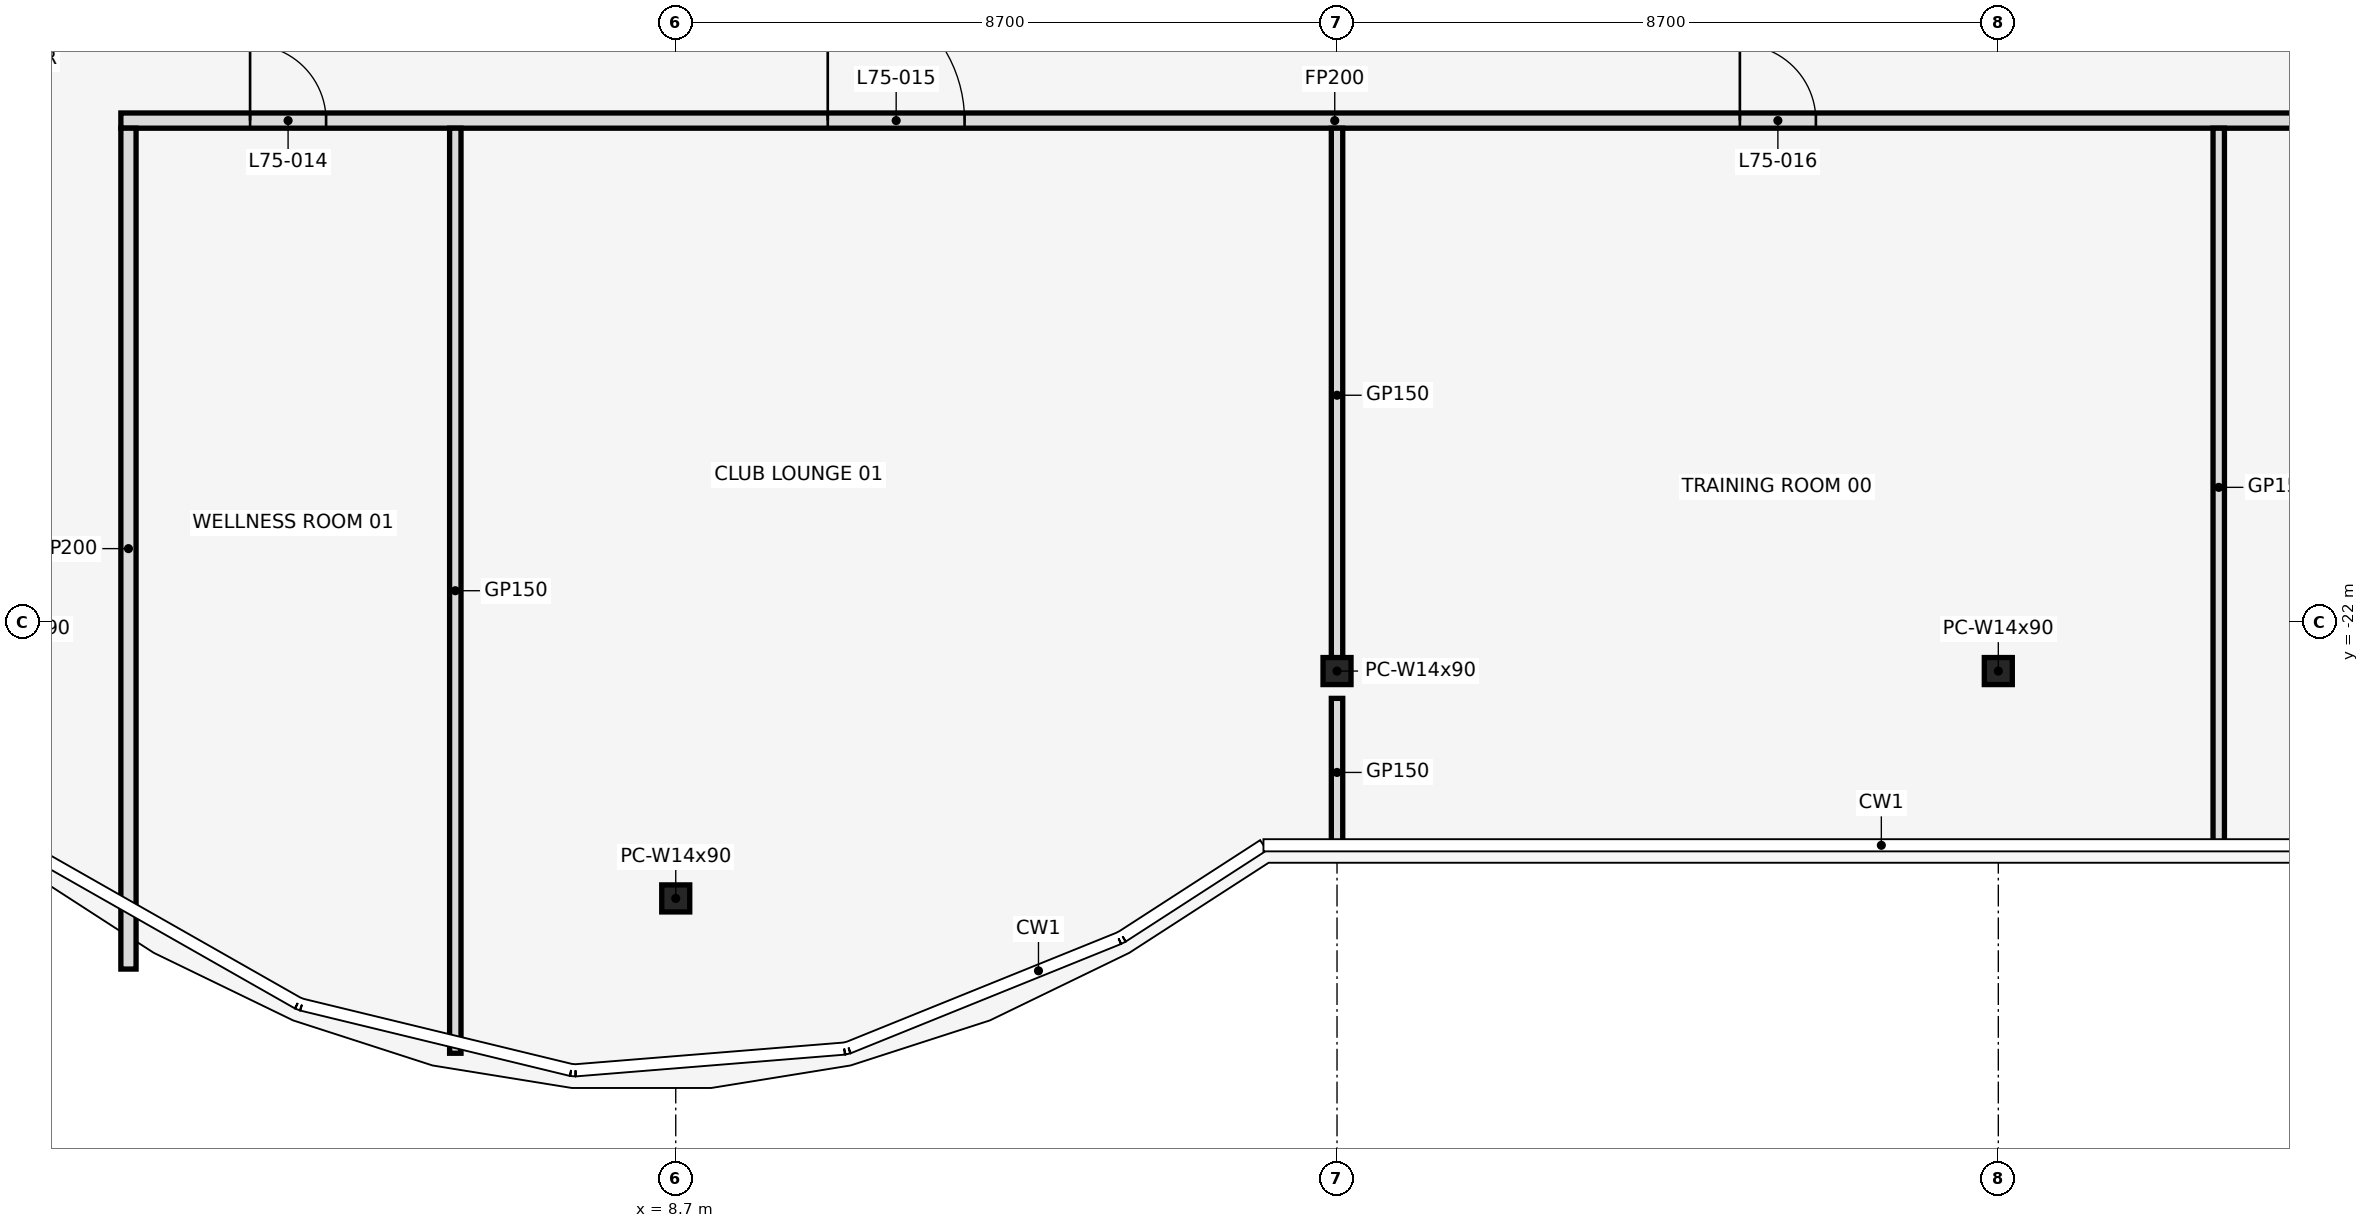
"""IFC4 building model, lengths in metres.
Left out: names, types, materials, properties, quantities, classifications, styles, units other than length and angle.
Written with IfcOpenShell. Run it as: python <this file> out.ifc"""

import sys

from ifc_helpers import new_model, si_unit, direction, frame, frame_2d, origin, origin_2d, place, context, subcontext, project, spatial, rectangle, i_section, extrude, element, fill, save


model = new_model("IFC4")
c1 = context("Model", 3, precision=1e-05, world=origin(), true_north=direction((0.0, 1.0)))
c2 = subcontext(c1, "Body", "Model", "MODEL_VIEW")
j1 = project(units=[si_unit("LENGTHUNIT", "METRE"), si_unit("PLANEANGLEUNIT", "RADIAN")], contexts=[c1])
p1 = place(None, origin())
s1 = spatial("IfcSite", under=j1, at=p1, CompositionType="ELEMENT")
p2 = place(p1, origin())
s2 = spatial("IfcBuilding", under=s1, at=p2, CompositionType="ELEMENT")
p3 = place(p2, frame((0.0, 0.0, 333.5)))
s3 = spatial("IfcBuildingStorey", under=s2, at=p3, CompositionType="ELEMENT", Elevation=333.5)
for number, where, z_axis, x_axis in (
    (1, (8.7, -25.633, 0.0), (0.0, 0.0, 1.0), (1.0, 0.0, 0.0)),
    (2, (17.4, -22.642, 0.0), (0.0, 0.0, 1.0), (1.0, 0.0, 0.0)),
    (3, (26.1, -22.642, 0.0), (0.0, 0.0, 1.0), (1.0, 0.0, 0.0)),
):
    element("IfcColumn", number, at=place(p3, frame(where, z_axis=z_axis, x_axis=x_axis)), inside=s3, PredefinedType="COLUMN", context=c2, shape_type="SweptSolid", body=[
        extrude(i_section(OverallWidth=0.368, OverallDepth=0.356, WebThickness=0.011, FlangeThickness=0.018, at=origin_2d()), origin(), (0.0, 0.0, 1.0), 4.5),
    ])
p4 = place(p3, frame((1.4, -15.4, 0.0), z_axis=(0.0, 0.0, 1.0), x_axis=(1.0, 0.0, 0.0)))
e4 = element("IfcWall", 4, at=p4, inside=s3, PredefinedType="PARTITIONING", context=c2, shape_type="SweptSolid", body=[
    extrude(rectangle(XDim=31.94, YDim=0.2, at=frame_2d((15.97, 0.0))), origin(), (0.0, 0.0, 1.0), 3.339),
])
p5 = place(p4, frame((1.7, 0.0, 0.0)))
e5 = element("IfcOpeningElement", 5, at=p5, cuts=e4, PredefinedType="OPENING", context=c2, shape_type="SweptSolid", body=[
    extrude(rectangle(XDim=1.0, YDim=2.1, at=frame_2d((0.5, 1.05))), frame((0.0, 0.112, 0.0), z_axis=(0.0, -1.0, 0.0), x_axis=(1.0, 0.0, 0.0)), (0.0, 0.0, 1.0), 0.224),
])
p6 = place(p4, frame((9.3, 0.0, 0.0)))
e6 = element("IfcOpeningElement", 6, at=p6, cuts=e4, PredefinedType="OPENING", context=c2, shape_type="SweptSolid", body=[
    extrude(rectangle(XDim=1.8, YDim=2.1, at=frame_2d((0.9, 1.05))), frame((0.0, 0.112, 0.0), z_axis=(0.0, -1.0, 0.0), x_axis=(1.0, 0.0, 0.0)), (0.0, 0.0, 1.0), 0.224),
])
p7 = place(p4, frame((21.3, 0.0, 0.0)))
e7 = element("IfcOpeningElement", 7, at=p7, cuts=e4, PredefinedType="OPENING", context=c2, shape_type="SweptSolid", body=[
    extrude(rectangle(XDim=1.0, YDim=2.1, at=frame_2d((0.5, 1.05))), frame((0.0, 0.112, 0.0), z_axis=(0.0, -1.0, 0.0), x_axis=(1.0, 0.0, 0.0)), (0.0, 0.0, 1.0), 0.224),
])
p8 = place(p4, frame((29.3, 0.0, 0.0)))
e8 = element("IfcOpeningElement", 8, at=p8, cuts=e4, PredefinedType="OPENING", context=c2, shape_type="SweptSolid", body=[
    extrude(rectangle(XDim=0.9, YDim=2.1, at=frame_2d((0.45, 1.05))), frame((0.0, 0.112, 0.0), z_axis=(0.0, -1.0, 0.0), x_axis=(1.0, 0.0, 0.0)), (0.0, 0.0, 1.0), 0.224),
])
p9 = place(p3, frame((1.5, -26.562, 0.0), z_axis=(0.0, 0.0, 1.0), x_axis=(0.0, 1.0, 0.0)))
e9 = element("IfcWall", 9, at=p9, inside=s3, PredefinedType="PARTITIONING", context=c2, shape_type="SweptSolid", body=[
    extrude(rectangle(XDim=11.062, YDim=0.2, at=frame_2d((5.531, 0.0))), origin(), (0.0, 0.0, 1.0), 3.339),
])
p10 = place(p3, frame((5.8, -27.67, 0.0), z_axis=(0.0, 0.0, 1.0), x_axis=(0.0, 1.0, 0.0)))
e10 = element("IfcWall", 10, at=p10, inside=s3, PredefinedType="PARTITIONING", context=c2, shape_type="SweptSolid", body=[
    extrude(rectangle(XDim=12.17, YDim=0.15, at=frame_2d((6.085, 0.0))), origin(), (0.0, 0.0, 1.0), 3.339),
])
p11 = place(p3, frame((17.4, -24.95, 0.0), z_axis=(0.0, 0.0, 1.0), x_axis=(0.0, 1.0, 0.0)))
e11 = element("IfcWall", 11, at=p11, inside=s3, PredefinedType="PARTITIONING", context=c2, shape_type="SweptSolid", body=[
    extrude(rectangle(XDim=1.949, YDim=0.15, at=frame_2d((0.974, 0.0))), origin(), (0.0, 0.0, 1.0), 3.339),
])
p12 = place(p3, frame((17.4, -22.527, 0.0), z_axis=(0.0, 0.0, 1.0), x_axis=(0.0, 1.0, 0.0)))
e12 = element("IfcWall", 12, at=p12, inside=s3, PredefinedType="PARTITIONING", context=c2, shape_type="SweptSolid", body=[
    extrude(rectangle(XDim=7.027, YDim=0.15, at=frame_2d((3.513, 0.0))), origin(), (0.0, 0.0, 1.0), 3.339),
])
p13 = place(p3, frame((29.0, -24.95, 0.0), z_axis=(0.0, 0.0, 1.0), x_axis=(0.0, 1.0, 0.0)))
e13 = element("IfcWall", 13, at=p13, inside=s3, PredefinedType="PARTITIONING", context=c2, shape_type="SweptSolid", body=[
    extrude(rectangle(XDim=9.45, YDim=0.15, at=frame_2d((4.725, 0.0))), origin(), (0.0, 0.0, 1.0), 3.339),
])
p14 = place(p5, frame((1.0, 0.0, 0.0), z_axis=(0.0, 0.0, 1.0), x_axis=(-1.0, 0.0, 0.0)))
e14 = element("IfcDoor", 14, at=p14, inside=s3, OperationType="SINGLE_SWING_RIGHT", PredefinedType="DOOR", context=c2, shape_type="SweptSolid", body=[
    extrude(rectangle(XDim=1.0, YDim=2.1, at=frame_2d((0.5, 1.05))), frame((0.0, 0.025, 0.0), z_axis=(0.0, -1.0, 0.0), x_axis=(1.0, 0.0, 0.0)), (0.0, 0.0, 1.0), 0.05),
])
fill(e5, e14)
p15 = place(p6, origin())
e15 = element("IfcDoor", 15, at=p15, inside=s3, OperationType="SINGLE_SWING_LEFT", PredefinedType="DOOR", context=c2, shape_type="SweptSolid", body=[
    extrude(rectangle(XDim=1.8, YDim=2.1, at=frame_2d((0.9, 1.05))), frame((0.0, 0.025, 0.0), z_axis=(0.0, -1.0, 0.0), x_axis=(1.0, 0.0, 0.0)), (0.0, 0.0, 1.0), 0.05),
])
fill(e6, e15)
p16 = place(p7, frame((1.0, 0.0, 0.0), z_axis=(0.0, 0.0, 1.0), x_axis=(-1.0, 0.0, 0.0)))
e16 = element("IfcDoor", 16, at=p16, inside=s3, OperationType="SINGLE_SWING_LEFT", PredefinedType="DOOR", context=c2, shape_type="SweptSolid", body=[
    extrude(rectangle(XDim=1.0, YDim=2.1, at=frame_2d((0.5, 1.05))), frame((0.0, 0.025, 0.0), z_axis=(0.0, -1.0, 0.0), x_axis=(1.0, 0.0, 0.0)), (0.0, 0.0, 1.0), 0.05),
])
fill(e7, e16)
save(model, sys.argv[1])
